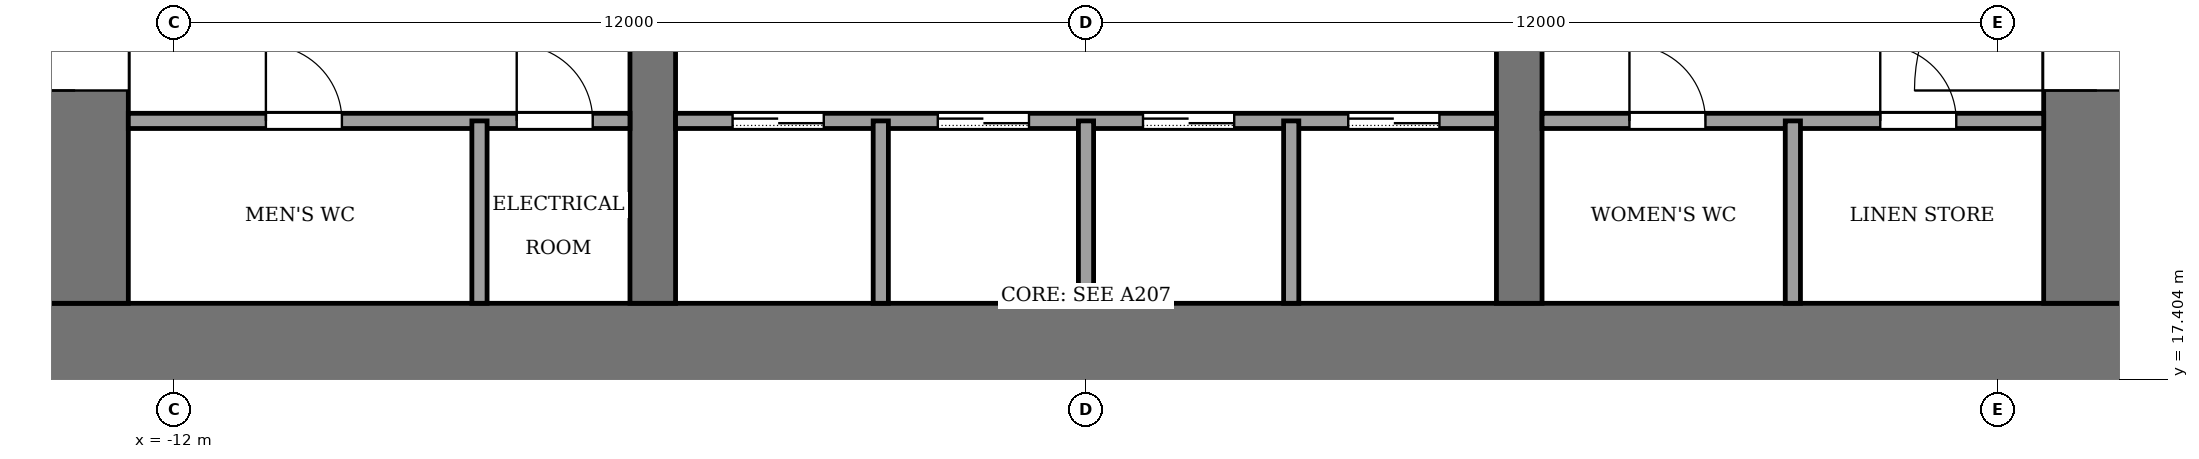
"""IFC4 building model, lengths in metres.
Left out: names, types, materials, properties, quantities, classifications, styles, units other than length and angle.
Written with IfcOpenShell. Run it as: python <this file> out.ifc"""

import sys

from ifc_helpers import new_model, si_unit, direction, frame, frame_2d, origin, place, context, subcontext, project, spatial, rectangle, extrude, element, fill, save


model = new_model("IFC4")
c1 = context("Model", 3, precision=1e-05, world=origin(), true_north=direction((0.0, 1.0)))
c2 = subcontext(c1, "Body", "Model", "MODEL_VIEW")
j1 = project(units=[si_unit("LENGTHUNIT", "METRE"), si_unit("PLANEANGLEUNIT", "RADIAN")], contexts=[c1])
p1 = place(None, origin())
s1 = spatial("IfcSite", under=j1, at=p1, CompositionType="ELEMENT")
p2 = place(p1, origin())
s2 = spatial("IfcBuilding", under=s1, at=p2, CompositionType="ELEMENT")
p3 = place(p2, frame((0.0, 0.0, 38.0)))
s3 = spatial("IfcBuildingStorey", under=s2, at=p3, CompositionType="ELEMENT", Elevation=38.0)
p4 = place(p3, frame((-14.0, 17.7, -0.13), z_axis=(0.0, 0.0, 1.0), x_axis=(1.0, 0.0, 0.0)))
e1 = element("IfcWall", 1, at=p4, inside=s3, PredefinedType="SHEAR", context=c2, shape_type="SweptSolid", body=[
    extrude(rectangle(XDim=28.0, YDim=1.4, at=frame_2d((14.0, 0.0))), origin(), (0.0, 0.0, 1.0), 4.0),
])
p5 = place(p3, frame((-13.3, 18.4, -0.13), z_axis=(0.0, 0.0, 1.0), x_axis=(0.0, 1.0, 0.0)))
e2 = element("IfcWall", 2, at=p5, inside=s3, PredefinedType="SHEAR", context=c2, shape_type="SweptSolid", body=[
    extrude(rectangle(XDim=19.2, YDim=1.4, at=frame_2d((9.6, 0.0))), origin(), (0.0, 0.0, 1.0), 4.0),
])
p6 = place(p5, frame((2.8, 0.0, 0.13)))
e3 = element("IfcOpeningElement", 3, at=p6, cuts=e2, PredefinedType="OPENING", context=c2, shape_type="SweptSolid", body=[
    extrude(rectangle(XDim=2.4, YDim=2.4, at=frame_2d((1.2, 1.2))), frame((0.0, 0.71, 0.0), z_axis=(0.0, -1.0, 0.0), x_axis=(1.0, 0.0, 0.0)), (0.0, 0.0, 1.0), 1.42),
])
p7 = place(p5, frame((13.4, 0.0, 0.13)))
e4 = element("IfcOpeningElement", 4, at=p7, cuts=e2, PredefinedType="OPENING", context=c2, shape_type="SweptSolid", body=[
    extrude(rectangle(XDim=1.4, YDim=2.2, at=frame_2d((0.7, 1.1))), frame((0.0, 0.71, 0.0), z_axis=(0.0, -1.0, 0.0), x_axis=(1.0, 0.0, 0.0)), (0.0, 0.0, 1.0), 1.42),
])
p8 = place(p3, frame((13.3, 18.4, -0.13), z_axis=(0.0, 0.0, 1.0), x_axis=(0.0, 1.0, 0.0)))
e5 = element("IfcWall", 5, at=p8, inside=s3, PredefinedType="SHEAR", context=c2, shape_type="SweptSolid", body=[
    extrude(rectangle(XDim=19.2, YDim=1.4, at=frame_2d((9.6, 0.0))), origin(), (0.0, 0.0, 1.0), 4.0),
])
p9 = place(p8, frame((2.8, 0.0, 0.13)))
e6 = element("IfcOpeningElement", 6, at=p9, cuts=e5, PredefinedType="OPENING", context=c2, shape_type="SweptSolid", body=[
    extrude(rectangle(XDim=2.4, YDim=2.4, at=frame_2d((1.2, 1.2))), frame((0.0, 0.71, 0.0), z_axis=(0.0, -1.0, 0.0), x_axis=(1.0, 0.0, 0.0)), (0.0, 0.0, 1.0), 1.42),
])
p10 = place(p8, frame((13.3, 0.0, 0.13)))
e7 = element("IfcOpeningElement", 7, at=p10, cuts=e5, PredefinedType="OPENING", context=c2, shape_type="SweptSolid", body=[
    extrude(rectangle(XDim=2.4, YDim=2.4, at=frame_2d((1.2, 1.2))), frame((0.0, 0.71, 0.0), z_axis=(0.0, -1.0, 0.0), x_axis=(1.0, 0.0, 0.0)), (0.0, 0.0, 1.0), 1.42),
])
p11 = place(p3, frame((-5.7, 18.4, -0.13), z_axis=(0.0, 0.0, 1.0), x_axis=(0.0, 1.0, 0.0)))
e8 = element("IfcWall", 8, at=p11, inside=s3, PredefinedType="SHEAR", context=c2, shape_type="SweptSolid", body=[
    extrude(rectangle(XDim=19.2, YDim=0.6, at=frame_2d((9.6, 0.0))), origin(), (0.0, 0.0, 1.0), 4.0),
])
p12 = place(p11, frame((8.35, 0.0, 0.13)))
e9 = element("IfcOpeningElement", 9, at=p12, cuts=e8, PredefinedType="OPENING", context=c2, shape_type="SweptSolid", body=[
    extrude(rectangle(XDim=0.9, YDim=2.1, at=frame_2d((0.45, 1.05))), frame((0.0, 0.31, 0.0), z_axis=(0.0, -1.0, 0.0), x_axis=(1.0, 0.0, 0.0)), (0.0, 0.0, 1.0), 0.62),
])
p13 = place(p3, frame((5.7, 18.4, -0.13), z_axis=(0.0, 0.0, 1.0), x_axis=(0.0, 1.0, 0.0)))
e10 = element("IfcWall", 10, at=p13, inside=s3, PredefinedType="SHEAR", context=c2, shape_type="SweptSolid", body=[
    extrude(rectangle(XDim=19.2, YDim=0.6, at=frame_2d((9.6, 0.0))), origin(), (0.0, 0.0, 1.0), 4.0),
])
p14 = place(p13, frame((8.35, 0.0, 0.13)))
e11 = element("IfcOpeningElement", 11, at=p14, cuts=e10, PredefinedType="OPENING", context=c2, shape_type="SweptSolid", body=[
    extrude(rectangle(XDim=0.9, YDim=2.1, at=frame_2d((0.45, 1.05))), frame((0.0, 0.31, 0.0), z_axis=(0.0, -1.0, 0.0), x_axis=(1.0, 0.0, 0.0)), (0.0, 0.0, 1.0), 0.62),
])
p15 = place(p13, frame((13.3, 0.0, 0.13)))
e12 = element("IfcOpeningElement", 12, at=p15, cuts=e10, PredefinedType="OPENING", context=c2, shape_type="SweptSolid", body=[
    extrude(rectangle(XDim=2.4, YDim=2.4, at=frame_2d((1.2, 1.2))), frame((0.0, 0.31, 0.0), z_axis=(0.0, -1.0, 0.0), x_axis=(1.0, 0.0, 0.0)), (0.0, 0.0, 1.0), 0.62),
])
p16 = place(p3, frame((-12.6, 20.8, 0.0), z_axis=(0.0, 0.0, 1.0), x_axis=(1.0, 0.0, 0.0)))
e13 = element("IfcWall", 13, at=p16, inside=s3, PredefinedType="PARTITIONING", context=c2, shape_type="SweptSolid", body=[
    extrude(rectangle(XDim=6.6, YDim=0.2, at=frame_2d((3.3, 0.0))), origin(), (0.0, 0.0, 1.0), 3.87),
])
p17 = place(p16, frame((1.81, 0.0, 0.0)))
e14 = element("IfcOpeningElement", 14, at=p17, cuts=e13, PredefinedType="OPENING", context=c2, shape_type="SweptSolid", body=[
    extrude(rectangle(XDim=1.0, YDim=2.1, at=frame_2d((0.5, 1.05))), frame((0.0, 0.11, 0.0), z_axis=(0.0, -1.0, 0.0), x_axis=(1.0, 0.0, 0.0)), (0.0, 0.0, 1.0), 0.22),
])
p18 = place(p16, frame((5.11, 0.0, 0.0)))
e15 = element("IfcOpeningElement", 15, at=p18, cuts=e13, PredefinedType="OPENING", context=c2, shape_type="SweptSolid", body=[
    extrude(rectangle(XDim=1.0, YDim=2.1, at=frame_2d((0.5, 1.05))), frame((0.0, 0.11, 0.0), z_axis=(0.0, -1.0, 0.0), x_axis=(1.0, 0.0, 0.0)), (0.0, 0.0, 1.0), 0.22),
])
p19 = place(p3, frame((-5.4, 20.8, 0.0), z_axis=(0.0, 0.0, 1.0), x_axis=(1.0, 0.0, 0.0)))
e16 = element("IfcWall", 16, at=p19, inside=s3, PredefinedType="PARTITIONING", context=c2, shape_type="SweptSolid", body=[
    extrude(rectangle(XDim=10.8, YDim=0.2, at=frame_2d((5.4, 0.0))), origin(), (0.0, 0.0, 1.0), 3.87),
])
p20 = place(p19, frame((0.75, 0.0, 0.0)))
e17 = element("IfcOpeningElement", 17, at=p20, cuts=e16, PredefinedType="OPENING", context=c2, shape_type="SweptSolid", body=[
    extrude(rectangle(XDim=1.2, YDim=2.2, at=frame_2d((0.6, 1.1))), frame((0.0, 0.11, 0.0), z_axis=(0.0, -1.0, 0.0), x_axis=(1.0, 0.0, 0.0)), (0.0, 0.0, 1.0), 0.22),
])
p21 = place(p19, frame((3.45, 0.0, 0.0)))
e18 = element("IfcOpeningElement", 18, at=p21, cuts=e16, PredefinedType="OPENING", context=c2, shape_type="SweptSolid", body=[
    extrude(rectangle(XDim=1.2, YDim=2.2, at=frame_2d((0.6, 1.1))), frame((0.0, 0.11, 0.0), z_axis=(0.0, -1.0, 0.0), x_axis=(1.0, 0.0, 0.0)), (0.0, 0.0, 1.0), 0.22),
])
p22 = place(p19, frame((6.15, 0.0, 0.0)))
e19 = element("IfcOpeningElement", 19, at=p22, cuts=e16, PredefinedType="OPENING", context=c2, shape_type="SweptSolid", body=[
    extrude(rectangle(XDim=1.2, YDim=2.2, at=frame_2d((0.6, 1.1))), frame((0.0, 0.11, 0.0), z_axis=(0.0, -1.0, 0.0), x_axis=(1.0, 0.0, 0.0)), (0.0, 0.0, 1.0), 0.22),
])
p23 = place(p19, frame((8.85, 0.0, 0.0)))
e20 = element("IfcOpeningElement", 20, at=p23, cuts=e16, PredefinedType="OPENING", context=c2, shape_type="SweptSolid", body=[
    extrude(rectangle(XDim=1.2, YDim=2.2, at=frame_2d((0.6, 1.1))), frame((0.0, 0.11, 0.0), z_axis=(0.0, -1.0, 0.0), x_axis=(1.0, 0.0, 0.0)), (0.0, 0.0, 1.0), 0.22),
])
p24 = place(p3, frame((6.0, 20.8, 0.0), z_axis=(0.0, 0.0, 1.0), x_axis=(1.0, 0.0, 0.0)))
e21 = element("IfcWall", 21, at=p24, inside=s3, PredefinedType="PARTITIONING", context=c2, shape_type="SweptSolid", body=[
    extrude(rectangle(XDim=6.6, YDim=0.2, at=frame_2d((3.3, 0.0))), origin(), (0.0, 0.0, 1.0), 3.87),
])
p25 = place(p24, frame((1.15, 0.0, 0.0)))
e22 = element("IfcOpeningElement", 22, at=p25, cuts=e21, PredefinedType="OPENING", context=c2, shape_type="SweptSolid", body=[
    extrude(rectangle(XDim=1.0, YDim=2.1, at=frame_2d((0.5, 1.05))), frame((0.0, 0.11, 0.0), z_axis=(0.0, -1.0, 0.0), x_axis=(1.0, 0.0, 0.0)), (0.0, 0.0, 1.0), 0.22),
])
p26 = place(p24, frame((4.45, 0.0, 0.0)))
e23 = element("IfcOpeningElement", 23, at=p26, cuts=e21, PredefinedType="OPENING", context=c2, shape_type="SweptSolid", body=[
    extrude(rectangle(XDim=1.0, YDim=2.1, at=frame_2d((0.5, 1.05))), frame((0.0, 0.11, 0.0), z_axis=(0.0, -1.0, 0.0), x_axis=(1.0, 0.0, 0.0)), (0.0, 0.0, 1.0), 0.22),
])
for number, where, z_axis, x_axis in (
    (24, (-7.98, 18.4, 0.0), (0.0, 0.0, 1.0), (0.0, 1.0, 0.0)),
    (25, (-2.7, 18.4, 0.0), (0.0, 0.0, 1.0), (0.0, 1.0, 0.0)),
    (26, (0.0, 18.4, 0.0), (0.0, 0.0, 1.0), (0.0, 1.0, 0.0)),
    (27, (2.7, 18.4, 0.0), (0.0, 0.0, 1.0), (0.0, 1.0, 0.0)),
    (28, (9.3, 18.4, 0.0), (0.0, 0.0, 1.0), (0.0, 1.0, 0.0)),
):
    element("IfcWall", number, at=place(p3, frame(where, z_axis=z_axis, x_axis=x_axis)), inside=s3, PredefinedType="PARTITIONING", context=c2, shape_type="SweptSolid", body=[
        extrude(rectangle(XDim=2.4, YDim=0.2, at=frame_2d((1.2, 0.0))), origin(), (0.0, 0.0, 1.0), 3.87),
    ])
p27 = place(p20, origin())
e29 = element("IfcDoor", 29, at=p27, inside=s3, OperationType="SLIDING_TO_LEFT", PredefinedType="DOOR", context=c2, shape_type="SweptSolid", body=[
    extrude(rectangle(XDim=1.2, YDim=2.2, at=frame_2d((0.6, 1.1))), frame((0.0, 0.025, 0.0), z_axis=(0.0, -1.0, 0.0), x_axis=(1.0, 0.0, 0.0)), (0.0, 0.0, 1.0), 0.05),
])
fill(e17, e29)
p28 = place(p21, origin())
e30 = element("IfcDoor", 30, at=p28, inside=s3, OperationType="SLIDING_TO_LEFT", PredefinedType="DOOR", context=c2, shape_type="SweptSolid", body=[
    extrude(rectangle(XDim=1.2, YDim=2.2, at=frame_2d((0.6, 1.1))), frame((0.0, 0.025, 0.0), z_axis=(0.0, -1.0, 0.0), x_axis=(1.0, 0.0, 0.0)), (0.0, 0.0, 1.0), 0.05),
])
fill(e18, e30)
p29 = place(p22, origin())
e31 = element("IfcDoor", 31, at=p29, inside=s3, OperationType="SLIDING_TO_LEFT", PredefinedType="DOOR", context=c2, shape_type="SweptSolid", body=[
    extrude(rectangle(XDim=1.2, YDim=2.2, at=frame_2d((0.6, 1.1))), frame((0.0, 0.025, 0.0), z_axis=(0.0, -1.0, 0.0), x_axis=(1.0, 0.0, 0.0)), (0.0, 0.0, 1.0), 0.05),
])
fill(e19, e31)
p30 = place(p23, origin())
e32 = element("IfcDoor", 32, at=p30, inside=s3, OperationType="SLIDING_TO_LEFT", PredefinedType="DOOR", context=c2, shape_type="SweptSolid", body=[
    extrude(rectangle(XDim=1.2, YDim=2.2, at=frame_2d((0.6, 1.1))), frame((0.0, 0.025, 0.0), z_axis=(0.0, -1.0, 0.0), x_axis=(1.0, 0.0, 0.0)), (0.0, 0.0, 1.0), 0.05),
])
fill(e20, e32)
p31 = place(p17, origin())
e33 = element("IfcDoor", 33, at=p31, inside=s3, OperationType="SINGLE_SWING_LEFT", PredefinedType="DOOR", context=c2, shape_type="SweptSolid", body=[
    extrude(rectangle(XDim=1.0, YDim=2.1, at=frame_2d((0.5, 1.05))), frame((0.0, 0.025, 0.0), z_axis=(0.0, -1.0, 0.0), x_axis=(1.0, 0.0, 0.0)), (0.0, 0.0, 1.0), 0.05),
])
fill(e14, e33)
p32 = place(p18, origin())
e34 = element("IfcDoor", 34, at=p32, inside=s3, OperationType="SINGLE_SWING_LEFT", PredefinedType="DOOR", context=c2, shape_type="SweptSolid", body=[
    extrude(rectangle(XDim=1.0, YDim=2.1, at=frame_2d((0.5, 1.05))), frame((0.0, 0.025, 0.0), z_axis=(0.0, -1.0, 0.0), x_axis=(1.0, 0.0, 0.0)), (0.0, 0.0, 1.0), 0.05),
])
fill(e15, e34)
p33 = place(p25, origin())
e35 = element("IfcDoor", 35, at=p33, inside=s3, OperationType="SINGLE_SWING_LEFT", PredefinedType="DOOR", context=c2, shape_type="SweptSolid", body=[
    extrude(rectangle(XDim=1.0, YDim=2.1, at=frame_2d((0.5, 1.05))), frame((0.0, 0.025, 0.0), z_axis=(0.0, -1.0, 0.0), x_axis=(1.0, 0.0, 0.0)), (0.0, 0.0, 1.0), 0.05),
])
fill(e22, e35)
p34 = place(p26, origin())
e36 = element("IfcDoor", 36, at=p34, inside=s3, OperationType="SINGLE_SWING_LEFT", PredefinedType="DOOR", context=c2, shape_type="SweptSolid", body=[
    extrude(rectangle(XDim=1.0, YDim=2.1, at=frame_2d((0.5, 1.05))), frame((0.0, 0.025, 0.0), z_axis=(0.0, -1.0, 0.0), x_axis=(1.0, 0.0, 0.0)), (0.0, 0.0, 1.0), 0.05),
])
fill(e23, e36)
p35 = place(p6, origin())
e37 = element("IfcDoor", 37, at=p35, inside=s3, OperationType="DOUBLE_DOOR_SINGLE_SWING", PredefinedType="DOOR", context=c2, shape_type="SweptSolid", body=[
    extrude(rectangle(XDim=2.4, YDim=2.4, at=frame_2d((1.2, 1.2))), frame((0.0, 0.025, 0.0), z_axis=(0.0, -1.0, 0.0), x_axis=(1.0, 0.0, 0.0)), (0.0, 0.0, 1.0), 0.05),
])
fill(e3, e37)
p36 = place(p9, origin())
e38 = element("IfcDoor", 38, at=p36, inside=s3, OperationType="DOUBLE_DOOR_SINGLE_SWING", PredefinedType="DOOR", context=c2, shape_type="SweptSolid", body=[
    extrude(rectangle(XDim=2.4, YDim=2.4, at=frame_2d((1.2, 1.2))), frame((0.0, 0.025, 0.0), z_axis=(0.0, -1.0, 0.0), x_axis=(1.0, 0.0, 0.0)), (0.0, 0.0, 1.0), 0.05),
])
fill(e6, e38)
save(model, sys.argv[1])
